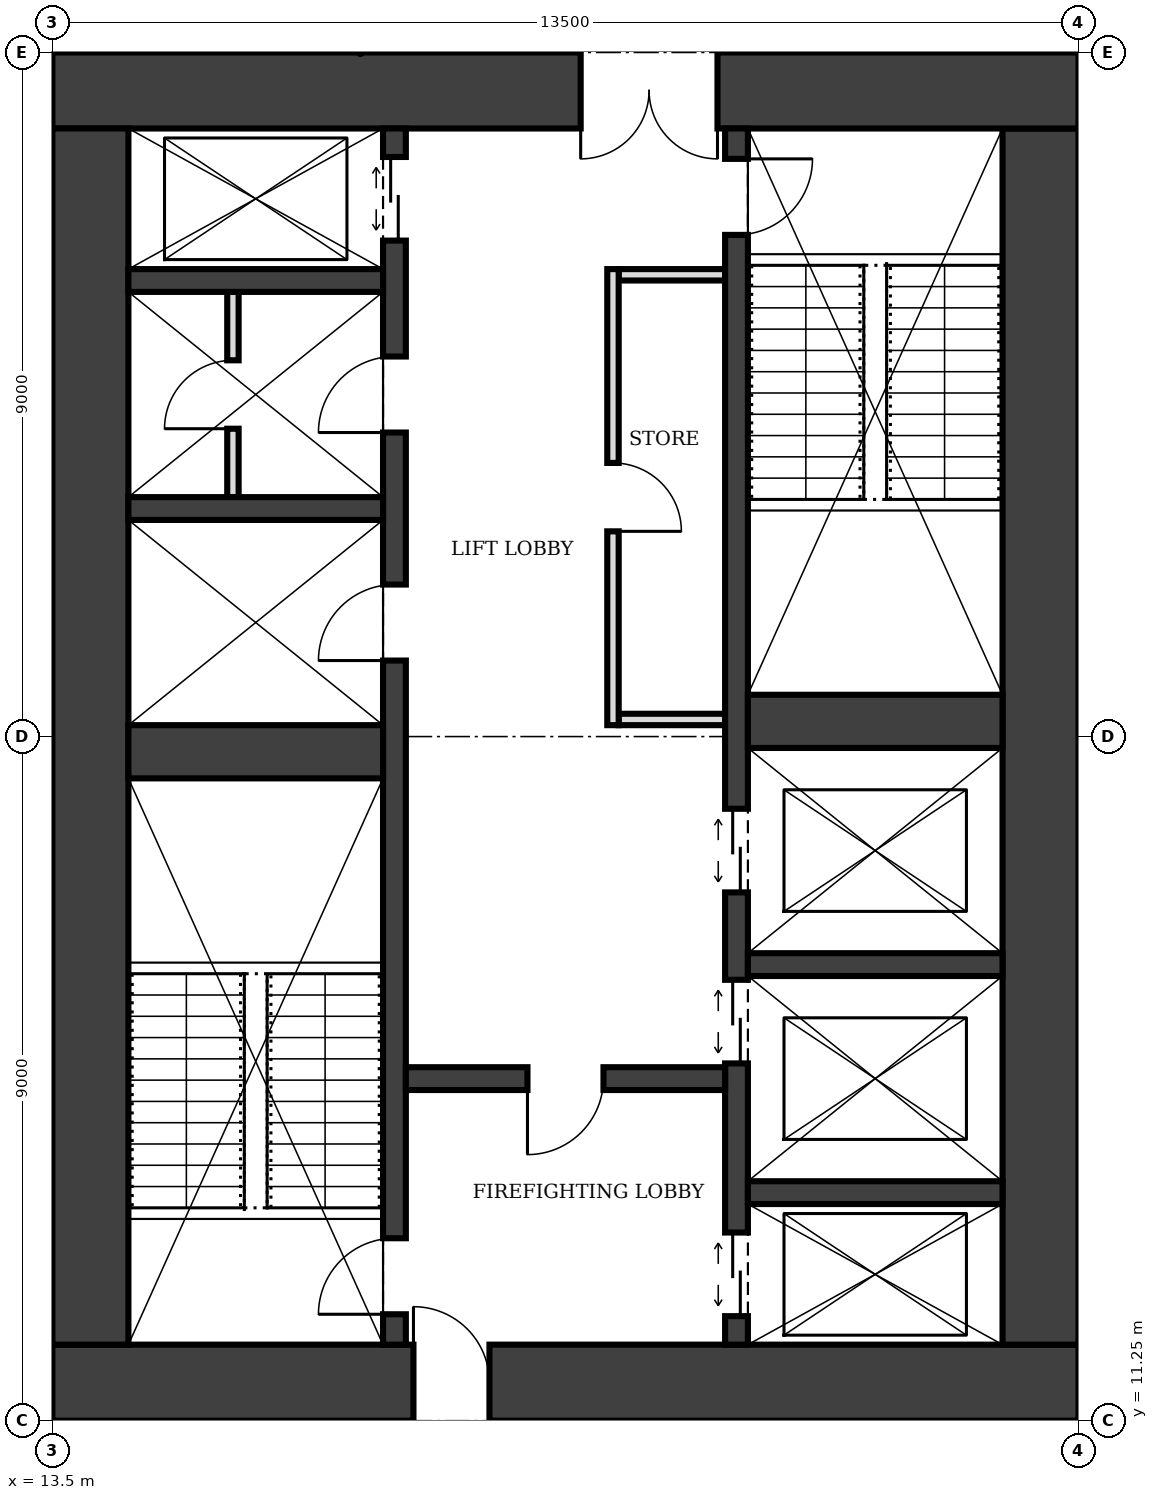
"""IFC4 building model, lengths in metres.
Left out: names, types, materials, properties, quantities, classifications, styles, units other than length and angle.
Written with IfcOpenShell. Run it as: python <this file> out.ifc"""

import sys

from ifc_helpers import new_model, si_unit, direction, frame, frame_2d, origin, place, context, subcontext, project, spatial, rectangle, extrude, element, fill, save


model = new_model("IFC4")
c1 = context("Model", 3, precision=1e-05, world=origin(), true_north=direction((0.0, 1.0)))
c2 = subcontext(c1, "Body", "Model", "MODEL_VIEW")
j1 = project(units=[si_unit("LENGTHUNIT", "METRE"), si_unit("PLANEANGLEUNIT", "RADIAN")], contexts=[c1])
p1 = place(None, origin())
s1 = spatial("IfcSite", under=j1, at=p1, CompositionType="ELEMENT")
p2 = place(p1, origin())
s2 = spatial("IfcBuilding", under=s1, at=p2, CompositionType="ELEMENT")
p3 = place(p2, frame((0.0, 0.0, 177.0)))
s3 = spatial("IfcBuildingStorey", under=s2, at=p3, CompositionType="ELEMENT", Elevation=177.0)
p4 = place(p3, frame((13.5, 11.75, 0.0), z_axis=(0.0, 0.0, 1.0), x_axis=(1.0, 0.0, 0.0)))
e1 = element("IfcWall", 1, at=p4, inside=s3, PredefinedType="SHEAR", context=c2, shape_type="SweptSolid", body=[
    extrude(rectangle(XDim=13.5, YDim=1.0, at=frame_2d((6.75, 0.0))), origin(), (0.0, 0.0, 1.0), 4.0),
])
p5 = place(p4, frame((4.75, 0.0, 0.0)))
e2 = element("IfcOpeningElement", 2, at=p5, cuts=e1, PredefinedType="OPENING", context=c2, shape_type="SweptSolid", body=[
    extrude(rectangle(XDim=1.0, YDim=2.1, at=frame_2d((0.5, 1.05))), frame((0.0, 0.51, 0.0), z_axis=(0.0, -1.0, 0.0), x_axis=(1.0, 0.0, 0.0)), (0.0, 0.0, 1.0), 1.02),
])
p6 = place(p3, frame((26.5, 12.25, 0.0), z_axis=(0.0, 0.0, 1.0), x_axis=(0.0, 1.0, 0.0)))
e3 = element("IfcWall", 3, at=p6, inside=s3, PredefinedType="SHEAR", context=c2, shape_type="SweptSolid", body=[
    extrude(rectangle(XDim=16.0, YDim=1.0, at=frame_2d((8.0, 0.0))), origin(), (0.0, 0.0, 1.0), 4.0),
])
p7 = place(p3, frame((27.0, 28.75, 0.0), z_axis=(0.0, 0.0, 1.0), x_axis=(-1.0, 0.0, 0.0)))
e4 = element("IfcWall", 4, at=p7, inside=s3, PredefinedType="SHEAR", context=c2, shape_type="SweptSolid", body=[
    extrude(rectangle(XDim=13.5, YDim=1.0, at=frame_2d((6.75, 0.0))), origin(), (0.0, 0.0, 1.0), 4.0),
])
p8 = place(p7, frame((4.75, 0.0, 0.0)))
e5 = element("IfcOpeningElement", 5, at=p8, cuts=e4, PredefinedType="OPENING", context=c2, shape_type="SweptSolid", body=[
    extrude(rectangle(XDim=1.8, YDim=2.1, at=frame_2d((0.9, 1.05))), frame((0.0, 0.51, 0.0), z_axis=(0.0, -1.0, 0.0), x_axis=(1.0, 0.0, 0.0)), (0.0, 0.0, 1.0), 1.02),
])
p9 = place(p3, frame((14.0, 28.25, 0.0), z_axis=(0.0, 0.0, 1.0), x_axis=(0.0, -1.0, 0.0)))
e6 = element("IfcWall", 6, at=p9, inside=s3, PredefinedType="SHEAR", context=c2, shape_type="SweptSolid", body=[
    extrude(rectangle(XDim=16.0, YDim=1.0, at=frame_2d((8.0, 0.0))), origin(), (0.0, 0.0, 1.0), 4.0),
])
p10 = place(p3, frame((18.0, 12.25, 0.0), z_axis=(0.0, 0.0, 1.0), x_axis=(0.0, 1.0, 0.0)))
e7 = element("IfcWall", 7, at=p10, inside=s3, PredefinedType="SHEAR", context=c2, shape_type="SweptSolid", body=[
    extrude(rectangle(XDim=16.0, YDim=0.3, at=frame_2d((8.0, 0.0))), origin(), (0.0, 0.0, 1.0), 4.0),
])
p11 = place(p10, frame((0.4, 0.0, 0.0)))
e8 = element("IfcOpeningElement", 8, at=p11, cuts=e7, PredefinedType="OPENING", context=c2, shape_type="SweptSolid", body=[
    extrude(rectangle(XDim=1.0, YDim=2.1, at=frame_2d((0.5, 1.05))), frame((0.0, 0.16, 0.0), z_axis=(0.0, -1.0, 0.0), x_axis=(1.0, 0.0, 0.0)), (0.0, 0.0, 1.0), 0.32),
])
p12 = place(p10, frame((14.525, 0.0, 0.0)))
e9 = element("IfcOpeningElement", 9, at=p12, cuts=e7, PredefinedType="OPENING", context=c2, shape_type="SweptSolid", body=[
    extrude(rectangle(XDim=1.1, YDim=2.1, at=frame_2d((0.55, 1.05))), frame((0.0, 0.16, 0.0), z_axis=(0.0, -1.0, 0.0), x_axis=(1.0, 0.0, 0.0)), (0.0, 0.0, 1.0), 0.32),
])
p13 = place(p10, frame((9.0, 0.0, 0.0)))
e10 = element("IfcOpeningElement", 10, at=p13, cuts=e7, PredefinedType="OPENING", context=c2, shape_type="SweptSolid", body=[
    extrude(rectangle(XDim=1.0, YDim=2.1, at=frame_2d((0.5, 1.05))), frame((0.0, 0.16, 0.0), z_axis=(0.0, -1.0, 0.0), x_axis=(1.0, 0.0, 0.0)), (0.0, 0.0, 1.0), 0.32),
])
p14 = place(p10, frame((12.0, 0.0, 0.0)))
e11 = element("IfcOpeningElement", 11, at=p14, cuts=e7, PredefinedType="OPENING", context=c2, shape_type="SweptSolid", body=[
    extrude(rectangle(XDim=1.0, YDim=2.1, at=frame_2d((0.5, 1.05))), frame((0.0, 0.16, 0.0), z_axis=(0.0, -1.0, 0.0), x_axis=(1.0, 0.0, 0.0)), (0.0, 0.0, 1.0), 0.32),
])
p15 = place(p3, frame((22.5, 12.25, 0.0), z_axis=(0.0, 0.0, 1.0), x_axis=(0.0, 1.0, 0.0)))
e12 = element("IfcWall", 12, at=p15, inside=s3, PredefinedType="SHEAR", context=c2, shape_type="SweptSolid", body=[
    extrude(rectangle(XDim=16.0, YDim=0.3, at=frame_2d((8.0, 0.0))), origin(), (0.0, 0.0, 1.0), 4.0),
])
p16 = place(p15, frame((14.6, 0.0, 0.0)))
e13 = element("IfcOpeningElement", 13, at=p16, cuts=e12, PredefinedType="OPENING", context=c2, shape_type="SweptSolid", body=[
    extrude(rectangle(XDim=1.0, YDim=2.1, at=frame_2d((0.5, 1.05))), frame((0.0, 0.16, 0.0), z_axis=(0.0, -1.0, 0.0), x_axis=(1.0, 0.0, 0.0)), (0.0, 0.0, 1.0), 0.32),
])
p17 = place(p15, frame((0.375, 0.0, 0.0)))
e14 = element("IfcOpeningElement", 14, at=p17, cuts=e12, PredefinedType="OPENING", context=c2, shape_type="SweptSolid", body=[
    extrude(rectangle(XDim=1.1, YDim=2.1, at=frame_2d((0.55, 1.05))), frame((0.0, 0.16, 0.0), z_axis=(0.0, -1.0, 0.0), x_axis=(1.0, 0.0, 0.0)), (0.0, 0.0, 1.0), 0.32),
])
p18 = place(p15, frame((3.7, 0.0, 0.0)))
e15 = element("IfcOpeningElement", 15, at=p18, cuts=e12, PredefinedType="OPENING", context=c2, shape_type="SweptSolid", body=[
    extrude(rectangle(XDim=1.1, YDim=2.1, at=frame_2d((0.55, 1.05))), frame((0.0, 0.16, 0.0), z_axis=(0.0, -1.0, 0.0), x_axis=(1.0, 0.0, 0.0)), (0.0, 0.0, 1.0), 0.32),
])
p19 = place(p15, frame((5.95, 0.0, 0.0)))
e16 = element("IfcOpeningElement", 16, at=p19, cuts=e12, PredefinedType="OPENING", context=c2, shape_type="SweptSolid", body=[
    extrude(rectangle(XDim=1.1, YDim=2.1, at=frame_2d((0.55, 1.05))), frame((0.0, 0.16, 0.0), z_axis=(0.0, -1.0, 0.0), x_axis=(1.0, 0.0, 0.0)), (0.0, 0.0, 1.0), 0.32),
])
p20 = place(p3, frame((14.5, 20.05, 0.0), z_axis=(0.0, 0.0, 1.0), x_axis=(1.0, 0.0, 0.0)))
e17 = element("IfcWall", 17, at=p20, inside=s3, PredefinedType="SHEAR", context=c2, shape_type="SweptSolid", body=[
    extrude(rectangle(XDim=3.35, YDim=0.7, at=frame_2d((1.675, 0.0))), origin(), (0.0, 0.0, 1.0), 4.0),
])
p21 = place(p3, frame((18.15, 15.75, 0.0), z_axis=(0.0, 0.0, 1.0), x_axis=(1.0, 0.0, 0.0)))
e18 = element("IfcWall", 18, at=p21, inside=s3, PredefinedType="SHEAR", context=c2, shape_type="SweptSolid", body=[
    extrude(rectangle(XDim=4.2, YDim=0.3, at=frame_2d((2.1, 0.0))), origin(), (0.0, 0.0, 1.0), 4.0),
])
p22 = place(p21, frame((1.6, 0.0, 0.0)))
e19 = element("IfcOpeningElement", 19, at=p22, cuts=e18, PredefinedType="OPENING", context=c2, shape_type="SweptSolid", body=[
    extrude(rectangle(XDim=1.0, YDim=2.1, at=frame_2d((0.5, 1.05))), frame((0.0, 0.16, 0.0), z_axis=(0.0, -1.0, 0.0), x_axis=(1.0, 0.0, 0.0)), (0.0, 0.0, 1.0), 0.32),
])
for number, where, z_axis, x_axis in (
    (20, (22.65, 14.25, 0.0), (0.0, 0.0, 1.0), (1.0, 0.0, 0.0)),
    (21, (22.65, 17.25, 0.0), (0.0, 0.0, 1.0), (1.0, 0.0, 0.0)),
):
    element("IfcWall", number, at=place(p3, frame(where, z_axis=z_axis, x_axis=x_axis)), inside=s3, PredefinedType="SHEAR", context=c2, shape_type="SweptSolid", body=[
        extrude(rectangle(XDim=3.35, YDim=0.3, at=frame_2d((1.675, 0.0))), origin(), (0.0, 0.0, 1.0), 4.0),
    ])
p23 = place(p3, frame((22.65, 20.45, 0.0), z_axis=(0.0, 0.0, 1.0), x_axis=(1.0, 0.0, 0.0)))
e22 = element("IfcWall", 22, at=p23, inside=s3, PredefinedType="SHEAR", context=c2, shape_type="SweptSolid", body=[
    extrude(rectangle(XDim=3.35, YDim=0.7, at=frame_2d((1.675, 0.0))), origin(), (0.0, 0.0, 1.0), 4.0),
])
for number, where, z_axis, x_axis in (
    (23, (14.5, 23.25, 0.0), (0.0, 0.0, 1.0), (1.0, 0.0, 0.0)),
    (24, (14.5, 26.25, 0.0), (0.0, 0.0, 1.0), (1.0, 0.0, 0.0)),
):
    element("IfcWall", number, at=place(p3, frame(where, z_axis=z_axis, x_axis=x_axis)), inside=s3, PredefinedType="SHEAR", context=c2, shape_type="SweptSolid", body=[
        extrude(rectangle(XDim=3.35, YDim=0.3, at=frame_2d((1.675, 0.0))), origin(), (0.0, 0.0, 1.0), 4.0),
    ])
p24 = place(p3, frame((20.875, 20.4, 0.0), z_axis=(0.0, 0.0, 1.0), x_axis=(0.0, 1.0, 0.0)))
e25 = element("IfcWall", 25, at=p24, inside=s3, PredefinedType="PARTITIONING", context=c2, shape_type="SweptSolid", body=[
    extrude(rectangle(XDim=6.0, YDim=0.15, at=frame_2d((3.0, 0.0))), origin(), (0.0, 0.0, 1.0), 3.75),
])
p25 = place(p24, frame((2.55, 0.0, 0.0)))
e26 = element("IfcOpeningElement", 26, at=p25, cuts=e25, PredefinedType="OPENING", context=c2, shape_type="SweptSolid", body=[
    extrude(rectangle(XDim=0.9, YDim=2.1, at=frame_2d((0.45, 1.05))), frame((0.0, 0.085, 0.0), z_axis=(0.0, -1.0, 0.0), x_axis=(1.0, 0.0, 0.0)), (0.0, 0.0, 1.0), 0.17),
])
for number, where, z_axis, x_axis in (
    (27, (20.95, 20.475, 0.0), (0.0, 0.0, 1.0), (1.0, 0.0, 0.0)),
    (28, (20.95, 26.325, 0.0), (0.0, 0.0, 1.0), (1.0, 0.0, 0.0)),
):
    element("IfcWall", number, at=place(p3, frame(where, z_axis=z_axis, x_axis=x_axis)), inside=s3, PredefinedType="PARTITIONING", context=c2, shape_type="SweptSolid", body=[
        extrude(rectangle(XDim=1.4, YDim=0.15, at=frame_2d((0.7, 0.0))), origin(), (0.0, 0.0, 1.0), 3.75),
    ])
p26 = place(p3, frame((15.875, 23.4, 0.0), z_axis=(0.0, 0.0, 1.0), x_axis=(0.0, 1.0, 0.0)))
e29 = element("IfcWall", 29, at=p26, inside=s3, PredefinedType="PARTITIONING", context=c2, shape_type="SweptSolid", body=[
    extrude(rectangle(XDim=2.7, YDim=0.15, at=frame_2d((1.35, 0.0))), origin(), (0.0, 0.0, 1.0), 3.75),
])
p27 = place(p26, frame((0.9, 0.0, 0.0)))
e30 = element("IfcOpeningElement", 30, at=p27, cuts=e29, PredefinedType="OPENING", context=c2, shape_type="SweptSolid", body=[
    extrude(rectangle(XDim=0.9, YDim=2.1, at=frame_2d((0.45, 1.05))), frame((0.0, 0.085, 0.0), z_axis=(0.0, -1.0, 0.0), x_axis=(1.0, 0.0, 0.0)), (0.0, 0.0, 1.0), 0.17),
])
p28 = place(p5, origin())
e31 = element("IfcDoor", 31, at=p28, inside=s3, OperationType="SINGLE_SWING_LEFT", PredefinedType="DOOR", context=c2, shape_type="SweptSolid", body=[
    extrude(rectangle(XDim=1.0, YDim=2.1, at=frame_2d((0.5, 1.05))), frame((0.0, 0.025, 0.0), z_axis=(0.0, -1.0, 0.0), x_axis=(1.0, 0.0, 0.0)), (0.0, 0.0, 1.0), 0.05),
])
fill(e2, e31)
p29 = place(p8, origin())
e32 = element("IfcDoor", 32, at=p29, inside=s3, OperationType="DOUBLE_DOOR_SINGLE_SWING", PredefinedType="DOOR", context=c2, shape_type="SweptSolid", body=[
    extrude(rectangle(XDim=1.8, YDim=2.1, at=frame_2d((0.9, 1.05))), frame((0.0, 0.025, 0.0), z_axis=(0.0, -1.0, 0.0), x_axis=(1.0, 0.0, 0.0)), (0.0, 0.0, 1.0), 0.05),
])
fill(e5, e32)
p30 = place(p22, frame((1.0, 0.0, 0.0), z_axis=(0.0, 0.0, 1.0), x_axis=(-1.0, 0.0, 0.0)))
e33 = element("IfcDoor", 33, at=p30, inside=s3, OperationType="SINGLE_SWING_RIGHT", PredefinedType="DOOR", context=c2, shape_type="SweptSolid", body=[
    extrude(rectangle(XDim=1.0, YDim=2.1, at=frame_2d((0.5, 1.05))), frame((0.0, 0.025, 0.0), z_axis=(0.0, -1.0, 0.0), x_axis=(1.0, 0.0, 0.0)), (0.0, 0.0, 1.0), 0.05),
])
fill(e19, e33)
p31 = place(p11, origin())
e34 = element("IfcDoor", 34, at=p31, inside=s3, OperationType="SINGLE_SWING_LEFT", PredefinedType="DOOR", context=c2, shape_type="SweptSolid", body=[
    extrude(rectangle(XDim=1.0, YDim=2.1, at=frame_2d((0.5, 1.05))), frame((0.0, 0.025, 0.0), z_axis=(0.0, -1.0, 0.0), x_axis=(1.0, 0.0, 0.0)), (0.0, 0.0, 1.0), 0.05),
])
fill(e8, e34)
p32 = place(p16, frame((1.0, 0.0, 0.0), z_axis=(0.0, 0.0, 1.0), x_axis=(-1.0, 0.0, 0.0)))
e35 = element("IfcDoor", 35, at=p32, inside=s3, OperationType="SINGLE_SWING_LEFT", PredefinedType="DOOR", context=c2, shape_type="SweptSolid", body=[
    extrude(rectangle(XDim=1.0, YDim=2.1, at=frame_2d((0.5, 1.05))), frame((0.0, 0.025, 0.0), z_axis=(0.0, -1.0, 0.0), x_axis=(1.0, 0.0, 0.0)), (0.0, 0.0, 1.0), 0.05),
])
fill(e13, e35)
p33 = place(p17, origin())
e36 = element("IfcDoor", 36, at=p33, inside=s3, OperationType="DOUBLE_DOOR_SLIDING", PredefinedType="DOOR", context=c2, shape_type="SweptSolid", body=[
    extrude(rectangle(XDim=1.1, YDim=2.1, at=frame_2d((0.55, 1.05))), frame((0.0, 0.025, 0.0), z_axis=(0.0, -1.0, 0.0), x_axis=(1.0, 0.0, 0.0)), (0.0, 0.0, 1.0), 0.05),
])
fill(e14, e36)
p34 = place(p12, origin())
e37 = element("IfcDoor", 37, at=p34, inside=s3, OperationType="DOUBLE_DOOR_SLIDING", PredefinedType="DOOR", context=c2, shape_type="SweptSolid", body=[
    extrude(rectangle(XDim=1.1, YDim=2.1, at=frame_2d((0.55, 1.05))), frame((0.0, 0.025, 0.0), z_axis=(0.0, -1.0, 0.0), x_axis=(1.0, 0.0, 0.0)), (0.0, 0.0, 1.0), 0.05),
])
fill(e9, e37)
p35 = place(p18, origin())
e38 = element("IfcDoor", 38, at=p35, inside=s3, OperationType="DOUBLE_DOOR_SLIDING", PredefinedType="DOOR", context=c2, shape_type="SweptSolid", body=[
    extrude(rectangle(XDim=1.1, YDim=2.1, at=frame_2d((0.55, 1.05))), frame((0.0, 0.025, 0.0), z_axis=(0.0, -1.0, 0.0), x_axis=(1.0, 0.0, 0.0)), (0.0, 0.0, 1.0), 0.05),
])
fill(e15, e38)
p36 = place(p19, origin())
e39 = element("IfcDoor", 39, at=p36, inside=s3, OperationType="DOUBLE_DOOR_SLIDING", PredefinedType="DOOR", context=c2, shape_type="SweptSolid", body=[
    extrude(rectangle(XDim=1.1, YDim=2.1, at=frame_2d((0.55, 1.05))), frame((0.0, 0.025, 0.0), z_axis=(0.0, -1.0, 0.0), x_axis=(1.0, 0.0, 0.0)), (0.0, 0.0, 1.0), 0.05),
])
fill(e16, e39)
p37 = place(p25, frame((0.9, 0.0, 0.0), z_axis=(0.0, 0.0, 1.0), x_axis=(-1.0, 0.0, 0.0)))
e40 = element("IfcDoor", 40, at=p37, inside=s3, OperationType="SINGLE_SWING_RIGHT", PredefinedType="DOOR", context=c2, shape_type="SweptSolid", body=[
    extrude(rectangle(XDim=0.9, YDim=2.1, at=frame_2d((0.45, 1.05))), frame((0.0, 0.025, 0.0), z_axis=(0.0, -1.0, 0.0), x_axis=(1.0, 0.0, 0.0)), (0.0, 0.0, 1.0), 0.05),
])
fill(e26, e40)
p38 = place(p13, origin())
e41 = element("IfcDoor", 41, at=p38, inside=s3, OperationType="SINGLE_SWING_LEFT", PredefinedType="DOOR", context=c2, shape_type="SweptSolid", body=[
    extrude(rectangle(XDim=1.0, YDim=2.1, at=frame_2d((0.5, 1.05))), frame((0.0, 0.025, 0.0), z_axis=(0.0, -1.0, 0.0), x_axis=(1.0, 0.0, 0.0)), (0.0, 0.0, 1.0), 0.05),
])
fill(e10, e41)
p39 = place(p14, origin())
e42 = element("IfcDoor", 42, at=p39, inside=s3, OperationType="SINGLE_SWING_LEFT", PredefinedType="DOOR", context=c2, shape_type="SweptSolid", body=[
    extrude(rectangle(XDim=1.0, YDim=2.1, at=frame_2d((0.5, 1.05))), frame((0.0, 0.025, 0.0), z_axis=(0.0, -1.0, 0.0), x_axis=(1.0, 0.0, 0.0)), (0.0, 0.0, 1.0), 0.05),
])
fill(e11, e42)
p40 = place(p27, origin())
e43 = element("IfcDoor", 43, at=p40, inside=s3, OperationType="SINGLE_SWING_LEFT", PredefinedType="DOOR", context=c2, shape_type="SweptSolid", body=[
    extrude(rectangle(XDim=0.9, YDim=2.1, at=frame_2d((0.45, 1.05))), frame((0.0, 0.025, 0.0), z_axis=(0.0, -1.0, 0.0), x_axis=(1.0, 0.0, 0.0)), (0.0, 0.0, 1.0), 0.05),
])
fill(e30, e43)
save(model, sys.argv[1])
